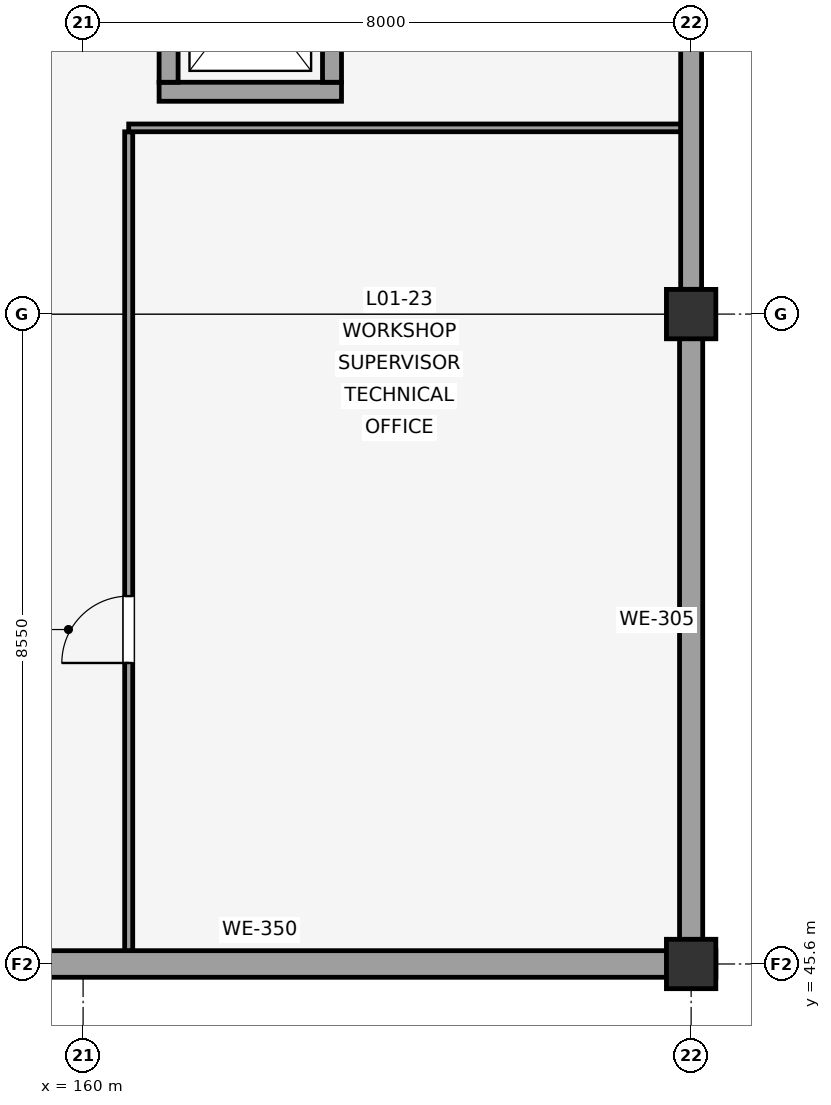
"""IFC4 building model, lengths in metres.
Left out: names, types, materials, properties, quantities, classifications, styles, units other than length and angle.
Written with IfcOpenShell. Run it as: python <this file> out.ifc"""

import sys

from ifc_helpers import new_model, si_unit, direction, frame, frame_2d, origin, origin_2d, place, context, subcontext, project, spatial, rectangle, extrude, element, fill, save


model = new_model("IFC4")
c1 = context("Model", 3, precision=1e-05, world=origin(), true_north=direction((0.0, 1.0)))
c2 = subcontext(c1, "Body", "Model", "MODEL_VIEW")
j1 = project(units=[si_unit("LENGTHUNIT", "METRE"), si_unit("PLANEANGLEUNIT", "RADIAN")], contexts=[c1])
p1 = place(None, origin())
s1 = spatial("IfcSite", under=j1, at=p1, CompositionType="ELEMENT")
p2 = place(p1, origin())
s2 = spatial("IfcBuilding", under=s1, at=p2, CompositionType="ELEMENT")
p3 = place(p2, frame((0.0, 0.0, 4.5)))
s3 = spatial("IfcBuildingStorey", under=s2, at=p3, CompositionType="ELEMENT", Elevation=4.5)
for number, where, z_axis, x_axis in (
    (1, (168.0, 45.6, 0.0), (0.0, 0.0, 1.0), (1.0, 0.0, 0.0)),
    (2, (168.0, 54.15, 0.0), (0.0, 0.0, 1.0), (1.0, 0.0, 0.0)),
):
    element("IfcColumn", number, at=place(p3, frame(where, z_axis=z_axis, x_axis=x_axis)), inside=s3, PredefinedType="COLUMN", context=c2, shape_type="SweptSolid", body=[
        extrude(rectangle(XDim=0.65, YDim=0.65, at=origin_2d()), origin(), (0.0, 0.0, 1.0), 4.5),
    ])
p4 = place(p3, frame((156.326, 45.6, 0.0), z_axis=(0.0, 0.0, 1.0), x_axis=(1.0, 0.0, 0.0)))
e3 = element("IfcWall", 3, at=p4, inside=s3, PredefinedType="SOLIDWALL", context=c2, shape_type="SweptSolid", body=[
    extrude(rectangle(XDim=11.999, YDim=0.35, at=frame_2d((6.0, 0.0))), origin(), (0.0, 0.0, 1.0), 3.12),
])
p5 = place(p3, frame((168.0, 45.776, 0.0), z_axis=(0.0, 0.0, 1.0), x_axis=(0.0, 1.0, 0.0)))
e4 = element("IfcWall", 4, at=p5, inside=s3, PredefinedType="SOLIDWALL", context=c2, shape_type="SweptSolid", body=[
    extrude(rectangle(XDim=8.699, YDim=0.305, at=frame_2d((4.35, 0.0))), origin(), (0.0, 0.0, 1.0), 3.12),
])
p6 = place(p3, frame((168.0, 54.476, 0.0), z_axis=(0.0, 0.0, 1.0), x_axis=(0.0, 1.0, 0.0)))
e5 = element("IfcWall", 5, at=p6, inside=s3, PredefinedType="SOLIDWALL", context=c2, shape_type="SweptSolid", body=[
    extrude(rectangle(XDim=8.549, YDim=0.275, at=frame_2d((4.274, 0.0))), origin(), (0.0, 0.0, 1.0), 3.12),
])
p7 = place(p3, frame((161.0, 57.075, 0.0), z_axis=(0.0, 0.0, 1.0), x_axis=(1.0, 0.0, 0.0)))
e6 = element("IfcWall", 6, at=p7, inside=s3, PredefinedType="SHEAR", context=c2, shape_type="SweptSolid", body=[
    extrude(rectangle(XDim=2.4, YDim=0.25, at=frame_2d((1.2, 0.0))), origin(), (0.0, 0.0, 1.0), 4.5),
])
p8 = place(p3, frame((161.125, 57.2, 0.0), z_axis=(0.0, 0.0, 1.0), x_axis=(0.0, 1.0, 0.0)))
e7 = element("IfcWall", 7, at=p8, inside=s3, PredefinedType="SHEAR", context=c2, shape_type="SweptSolid", body=[
    extrude(rectangle(XDim=2.4, YDim=0.25, at=frame_2d((1.2, 0.0))), origin(), (0.0, 0.0, 1.0), 4.5),
])
p9 = place(p8, frame((0.65, 0.0, 0.0)))
e8 = element("IfcOpeningElement", 8, at=p9, cuts=e7, PredefinedType="OPENING", context=c2, shape_type="SweptSolid", body=[
    extrude(rectangle(XDim=1.1, YDim=2.15, at=frame_2d((0.55, 1.075))), frame((0.0, 0.135, 0.0), z_axis=(0.0, -1.0, 0.0), x_axis=(1.0, 0.0, 0.0)), (0.0, 0.0, 1.0), 0.27),
])
p10 = place(p3, frame((163.275, 57.2, 0.0), z_axis=(0.0, 0.0, 1.0), x_axis=(0.0, 1.0, 0.0)))
e9 = element("IfcWall", 9, at=p10, inside=s3, PredefinedType="SHEAR", context=c2, shape_type="SweptSolid", body=[
    extrude(rectangle(XDim=2.4, YDim=0.25, at=frame_2d((1.2, 0.0))), origin(), (0.0, 0.0, 1.0), 4.5),
])
p11 = place(p3, frame((160.6, 45.776, 0.0), z_axis=(0.0, 0.0, 1.0), x_axis=(0.0, 1.0, 0.0)))
e10 = element("IfcWall", 10, at=p11, inside=s3, PredefinedType="PARTITIONING", context=c2, shape_type="SweptSolid", body=[
    extrude(rectangle(XDim=10.772, YDim=0.106, at=frame_2d((5.386, 0.0))), origin(), (0.0, 0.0, 1.0), 2.7),
])
p12 = place(p11, frame((3.784, 0.0, 0.0)))
e11 = element("IfcOpeningElement", 11, at=p12, cuts=e10, PredefinedType="OPENING", context=c2, shape_type="SweptSolid", body=[
    extrude(rectangle(XDim=0.88, YDim=2.1, at=frame_2d((0.44, 1.05))), frame((0.0, 0.063, 0.0), z_axis=(0.0, -1.0, 0.0), x_axis=(1.0, 0.0, 0.0)), (0.0, 0.0, 1.0), 0.126),
])
p13 = place(p3, frame((160.6, 56.6, 0.0), z_axis=(0.0, 0.0, 1.0), x_axis=(1.0, 0.0, 0.0)))
e12 = element("IfcWall", 12, at=p13, inside=s3, PredefinedType="PARTITIONING", context=c2, shape_type="SweptSolid", body=[
    extrude(rectangle(XDim=7.261, YDim=0.102, at=frame_2d((3.631, 0.0))), origin(), (0.0, 0.0, 1.0), 2.7),
])
p14 = place(p12, origin())
e13 = element("IfcDoor", 13, at=p14, inside=s3, OperationType="SINGLE_SWING_LEFT", PredefinedType="DOOR", context=c2, shape_type="SweptSolid", body=[
    extrude(rectangle(XDim=0.88, YDim=2.1, at=frame_2d((0.44, 1.05))), frame((0.0, 0.025, 0.0), z_axis=(0.0, -1.0, 0.0), x_axis=(1.0, 0.0, 0.0)), (0.0, 0.0, 1.0), 0.05),
])
fill(e11, e13)
save(model, sys.argv[1])
